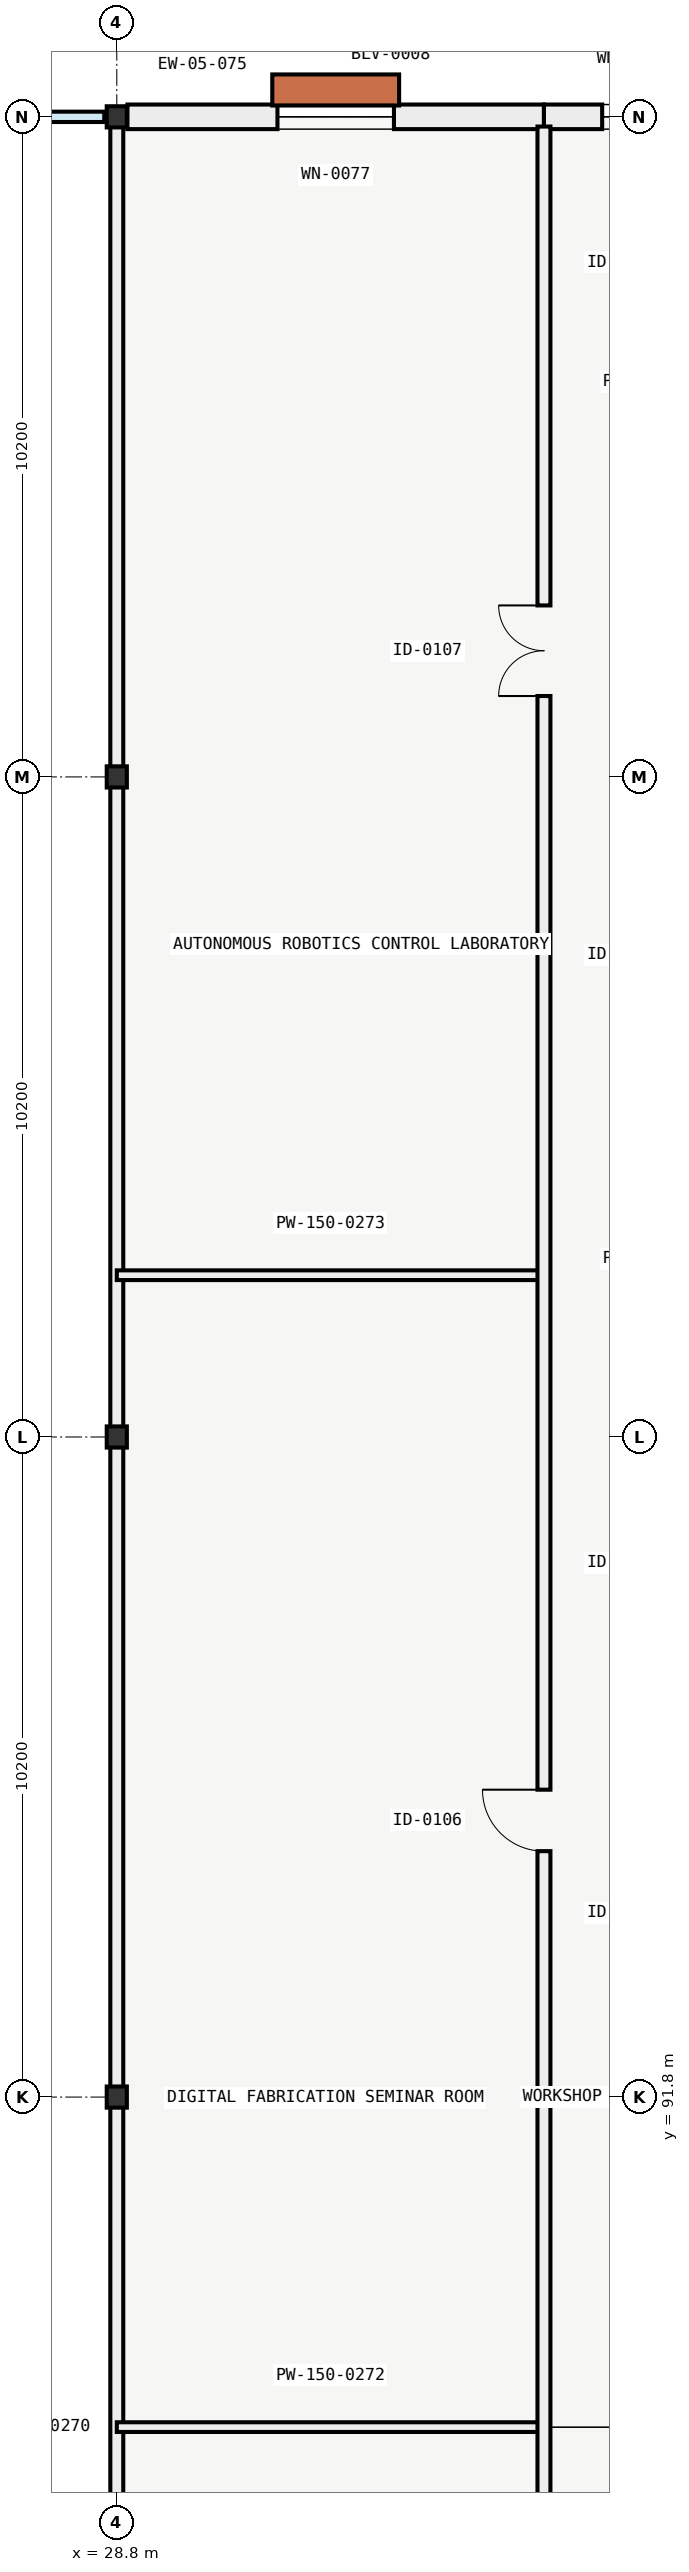
"""IFC4 building model, lengths in metres.
Left out: names, types, materials, properties, quantities, classifications, styles, units other than length and angle.
Written with IfcOpenShell. Run it as: python <this file> out.ifc"""

import sys

from ifc_helpers import new_model, si_unit, direction, frame, frame_2d, origin, origin_2d, place, context, subcontext, project, spatial, rectangle, i_section, extrude, element, fill, save


model = new_model("IFC4")
c1 = context("Model", 3, precision=1e-05, world=origin(), true_north=direction((0.0, 1.0)))
c2 = subcontext(c1, "Body", "Model", "MODEL_VIEW")
j1 = project(units=[si_unit("LENGTHUNIT", "METRE"), si_unit("PLANEANGLEUNIT", "RADIAN")], contexts=[c1])
p1 = place(None, origin())
s1 = spatial("IfcSite", under=j1, at=p1, CompositionType="ELEMENT")
p2 = place(p1, origin())
s2 = spatial("IfcBuilding", under=s1, at=p2, CompositionType="ELEMENT")
p3 = place(p2, frame((0.0, 0.0, 5.4)))
s3 = spatial("IfcBuildingStorey", under=s2, at=p3, CompositionType="ELEMENT", Elevation=5.4)
for number, where, z_axis, x_axis in (
    (1, (28.8, 91.8, 0.0), (0.0, 0.0, 1.0), (1.0, 0.0, 0.0)),
    (2, (28.8, 102.0, 0.0), (0.0, 0.0, 1.0), (1.0, 0.0, 0.0)),
    (3, (28.8, 112.2, 0.0), (0.0, 0.0, 1.0), (1.0, 0.0, 0.0)),
    (4, (28.8, 122.4, 0.0), (0.0, 0.0, 1.0), (1.0, 0.0, 0.0)),
):
    element("IfcColumn", number, at=place(p3, frame(where, z_axis=z_axis, x_axis=x_axis)), inside=s3, PredefinedType="COLUMN", context=c2, shape_type="SweptSolid", body=[
        extrude(i_section(OverallWidth=0.311, OverallDepth=0.327, WebThickness=0.016, FlangeThickness=0.025, FilletRadius=0.017, at=origin_2d()), origin(), (0.0, 0.0, 1.0), 4.2),
    ])
p4 = place(p3, frame((28.965, 122.4, 0.0), z_axis=(0.0, 0.0, 1.0), x_axis=(1.0, 0.0, 0.0)))
e5 = element("IfcWall", 5, at=p4, inside=s3, PredefinedType="SOLIDWALL", context=c2, shape_type="SweptSolid", body=[
    extrude(rectangle(XDim=6.435, YDim=0.38, at=frame_2d((3.218, 0.0))), origin(), (0.0, 0.0, 1.0), 3.298),
])
p5 = place(p4, frame((2.318, 0.0, 0.9)))
e6 = element("IfcOpeningElement", 6, at=p5, cuts=e5, PredefinedType="OPENING", context=c2, shape_type="SweptSolid", body=[
    extrude(rectangle(XDim=1.8, YDim=2.1, at=frame_2d((0.9, 1.05))), frame((0.0, 0.2, 0.0), z_axis=(0.0, -1.0, 0.0), x_axis=(1.0, 0.0, 0.0)), (0.0, 0.0, 1.0), 0.4),
])
p6 = place(p3, frame((35.4, 122.4, 0.0), z_axis=(0.0, 0.0, 1.0), x_axis=(1.0, 0.0, 0.0)))
e7 = element("IfcWall", 7, at=p6, inside=s3, PredefinedType="SOLIDWALL", context=c2, shape_type="SweptSolid", body=[
    extrude(rectangle(XDim=2.699, YDim=0.38, at=frame_2d((1.35, 0.0))), origin(), (0.0, 0.0, 1.0), 3.298),
])
p7 = place(p6, frame((0.899, 0.0, 0.85)))
e8 = element("IfcOpeningElement", 8, at=p7, cuts=e7, PredefinedType="OPENING", context=c2, shape_type="SweptSolid", body=[
    extrude(rectangle(XDim=0.9, YDim=2.2, at=frame_2d((0.45, 1.1))), frame((0.0, 0.2, 0.0), z_axis=(0.0, -1.0, 0.0), x_axis=(1.0, 0.0, 0.0)), (0.0, 0.0, 1.0), 0.4),
])
p8 = place(p3, frame((28.8, 51.15, 0.0), z_axis=(0.0, 0.0, 1.0), x_axis=(0.0, 1.0, 0.0)))
e9 = element("IfcWall", 9, at=p8, inside=s3, PredefinedType="PARTITIONING", context=c2, shape_type="SweptSolid", body=[
    extrude(rectangle(XDim=71.1, YDim=0.2, at=frame_2d((35.55, 0.0))), origin(), (0.0, 0.0, 1.0), 3.0),
])
for number, where, z_axis, x_axis in (
    (10, (28.8, 86.7, 0.0), (0.0, 0.0, 1.0), (1.0, 0.0, 0.0)),
    (11, (28.8, 104.5, 0.0), (0.0, 0.0, 1.0), (1.0, 0.0, 0.0)),
):
    element("IfcWall", number, at=place(p3, frame(where, z_axis=z_axis, x_axis=x_axis)), inside=s3, PredefinedType="PARTITIONING", context=c2, shape_type="SweptSolid", body=[
        extrude(rectangle(XDim=6.6, YDim=0.15, at=frame_2d((3.3, 0.0))), origin(), (0.0, 0.0, 1.0), 3.443),
    ])
p9 = place(p3, frame((35.4, 51.15, 0.0), z_axis=(0.0, 0.0, 1.0), x_axis=(0.0, 1.0, 0.0)))
e12 = element("IfcWall", 12, at=p9, inside=s3, PredefinedType="PARTITIONING", context=c2, shape_type="SweptSolid", body=[
    extrude(rectangle(XDim=71.1, YDim=0.2, at=frame_2d((35.55, 0.0))), origin(), (0.0, 0.0, 1.0), 3.298),
])
p10 = place(p9, frame((8.6, 0.0, 0.0)))
e13 = element("IfcOpeningElement", 13, at=p10, cuts=e12, PredefinedType="OPENING", context=c2, shape_type="SweptSolid", body=[
    extrude(rectangle(XDim=0.95, YDim=2.1, at=frame_2d((0.475, 1.05))), frame((0.0, 0.11, 0.0), z_axis=(0.0, -1.0, 0.0), x_axis=(1.0, 0.0, 0.0)), (0.0, 0.0, 1.0), 0.22),
])
p11 = place(p9, frame((26.45, 0.0, 0.0)))
e14 = element("IfcOpeningElement", 14, at=p11, cuts=e12, PredefinedType="OPENING", context=c2, shape_type="SweptSolid", body=[
    extrude(rectangle(XDim=1.4, YDim=2.2, at=frame_2d((0.7, 1.1))), frame((0.0, 0.11, 0.0), z_axis=(0.0, -1.0, 0.0), x_axis=(1.0, 0.0, 0.0)), (0.0, 0.0, 1.0), 0.22),
])
p12 = place(p9, frame((44.45, 0.0, 0.0)))
e15 = element("IfcOpeningElement", 15, at=p12, cuts=e12, PredefinedType="OPENING", context=c2, shape_type="SweptSolid", body=[
    extrude(rectangle(XDim=0.95, YDim=2.1, at=frame_2d((0.475, 1.05))), frame((0.0, 0.11, 0.0), z_axis=(0.0, -1.0, 0.0), x_axis=(1.0, 0.0, 0.0)), (0.0, 0.0, 1.0), 0.22),
])
p13 = place(p9, frame((62.3, 0.0, 0.0)))
e16 = element("IfcOpeningElement", 16, at=p13, cuts=e12, PredefinedType="OPENING", context=c2, shape_type="SweptSolid", body=[
    extrude(rectangle(XDim=1.4, YDim=2.2, at=frame_2d((0.7, 1.1))), frame((0.0, 0.11, 0.0), z_axis=(0.0, -1.0, 0.0), x_axis=(1.0, 0.0, 0.0)), (0.0, 0.0, 1.0), 0.22),
])
p14 = place(p5, origin())
e17 = element("IfcWindow", 17, at=p14, inside=s3, PartitioningType="SINGLE_PANEL", PredefinedType="WINDOW", context=c2, shape_type="SweptSolid", body=[
    extrude(rectangle(XDim=1.8, YDim=2.1, at=frame_2d((0.9, 1.05))), frame((0.0, 0.03, 0.0), z_axis=(0.0, -1.0, 0.0), x_axis=(1.0, 0.0, 0.0)), (0.0, 0.0, 1.0), 0.06),
])
fill(e6, e17)
p15 = place(p7, origin())
e18 = element("IfcWindow", 18, at=p15, inside=s3, PartitioningType="SINGLE_PANEL", PredefinedType="WINDOW", context=c2, shape_type="SweptSolid", body=[
    extrude(rectangle(XDim=0.9, YDim=2.2, at=frame_2d((0.45, 1.1))), frame((0.0, 0.03, 0.0), z_axis=(0.0, -1.0, 0.0), x_axis=(1.0, 0.0, 0.0)), (0.0, 0.0, 1.0), 0.06),
])
fill(e8, e18)
p16 = place(p12, origin())
e19 = element("IfcDoor", 19, at=p16, inside=s3, OperationType="SINGLE_SWING_RIGHT", PredefinedType="DOOR", context=c2, shape_type="SweptSolid", body=[
    extrude(rectangle(XDim=0.95, YDim=2.1, at=frame_2d((0.475, 1.05))), frame((0.0, 0.025, 0.0), z_axis=(0.0, -1.0, 0.0), x_axis=(1.0, 0.0, 0.0)), (0.0, 0.0, 1.0), 0.05),
])
fill(e15, e19)
p17 = place(p13, origin())
e20 = element("IfcDoor", 20, at=p17, inside=s3, OperationType="DOUBLE_DOOR_SINGLE_SWING", PredefinedType="DOOR", context=c2, shape_type="SweptSolid", body=[
    extrude(rectangle(XDim=1.4, YDim=2.2, at=frame_2d((0.7, 1.1))), frame((0.0, 0.025, 0.0), z_axis=(0.0, -1.0, 0.0), x_axis=(1.0, 0.0, 0.0)), (0.0, 0.0, 1.0), 0.05),
])
fill(e16, e20)
save(model, sys.argv[1])
